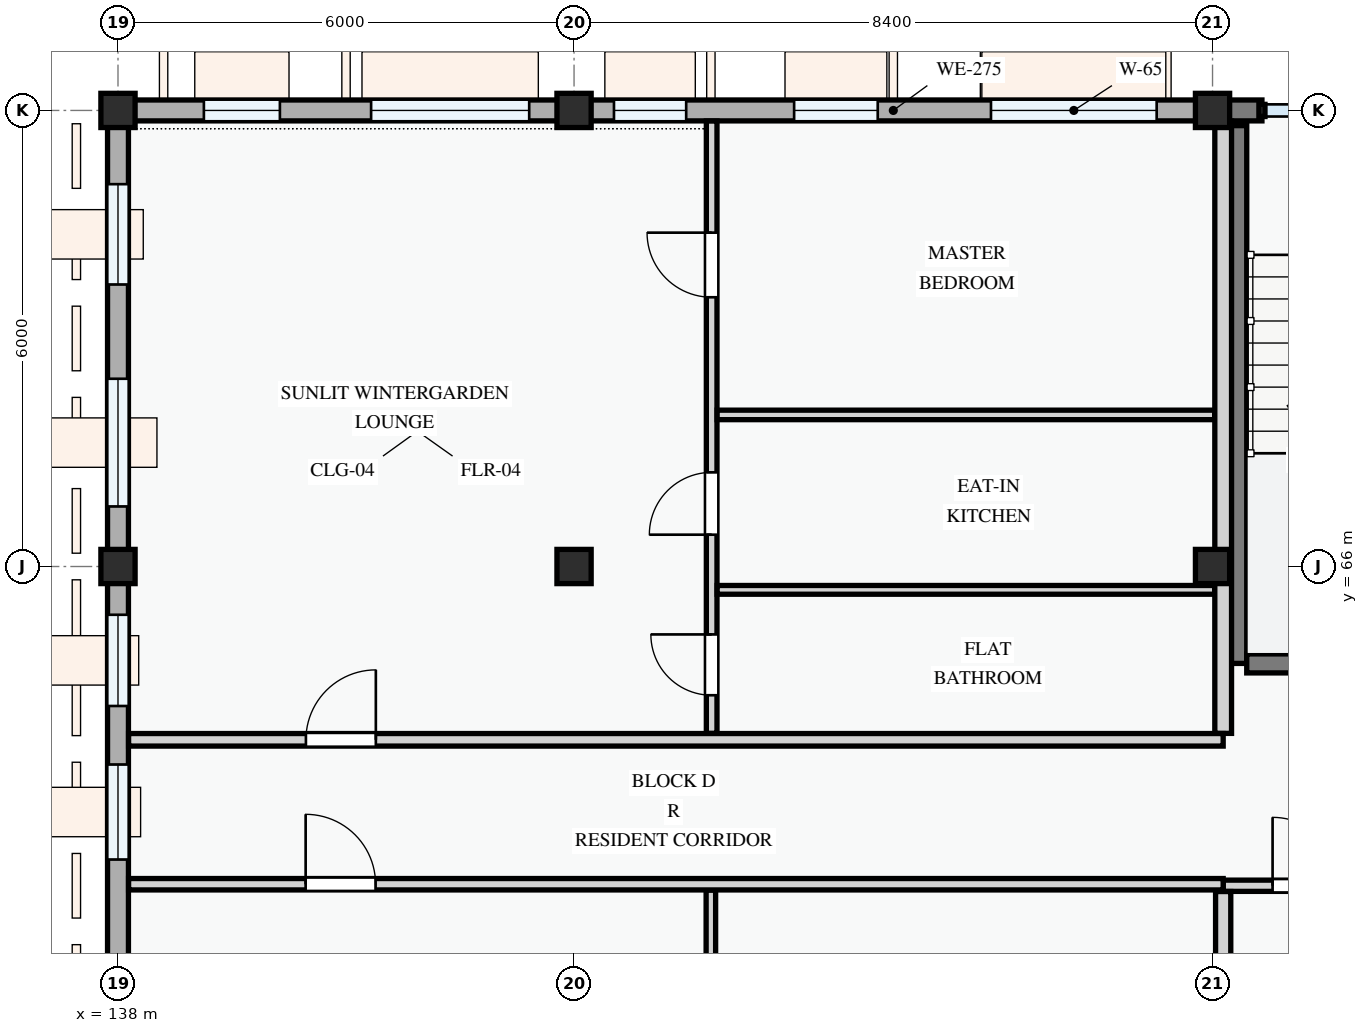
"""IFC4 building model, lengths in metres.
Left out: names, types, materials, properties, quantities, classifications, styles, units other than length and angle.
Written with IfcOpenShell. Run it as: python <this file> out.ifc"""

import sys

from ifc_helpers import new_model, si_unit, direction, frame, frame_2d, origin, origin_2d, place, context, subcontext, project, spatial, rectangle, extrude, element, fill, save


model = new_model("IFC4")
c1 = context("Model", 3, precision=1e-05, world=origin(), true_north=direction((0.0, 1.0)))
c2 = subcontext(c1, "Body", "Model", "MODEL_VIEW")
j1 = project(units=[si_unit("LENGTHUNIT", "METRE"), si_unit("PLANEANGLEUNIT", "RADIAN")], contexts=[c1])
p1 = place(None, origin())
s1 = spatial("IfcSite", under=j1, at=p1, CompositionType="ELEMENT")
p2 = place(p1, origin())
s2 = spatial("IfcBuilding", under=s1, at=p2, CompositionType="ELEMENT")
p3 = place(p2, frame((0.0, 0.0, 21.3)))
s3 = spatial("IfcBuildingStorey", under=s2, at=p3, CompositionType="ELEMENT", Elevation=21.3)
for number, where, z_axis, x_axis in (
    (1, (138.0, 66.0, 0.0), (0.0, 0.0, 1.0), (1.0, 0.0, 0.0)),
    (2, (138.0, 72.0, 0.0), (0.0, 0.0, 1.0), (1.0, 0.0, 0.0)),
    (3, (144.0, 66.0, 0.0), (0.0, 0.0, 1.0), (1.0, 0.0, 0.0)),
    (4, (144.0, 72.0, 0.0), (0.0, 0.0, 1.0), (1.0, 0.0, 0.0)),
    (5, (152.4, 66.0, 0.0), (0.0, 0.0, 1.0), (1.0, 0.0, 0.0)),
    (6, (152.4, 72.0, 0.0), (0.0, 0.0, 1.0), (1.0, 0.0, 0.0)),
):
    element("IfcColumn", number, at=place(p3, frame(where, z_axis=z_axis, x_axis=x_axis)), inside=s3, PredefinedType="COLUMN", context=c2, shape_type="SweptSolid", body=[
        extrude(rectangle(XDim=0.45, YDim=0.45, at=origin_2d()), origin(), (0.0, 0.0, 1.0), 3.3),
    ])
p4 = place(p3, frame((152.4, 72.0, 0.0), z_axis=(0.0, 0.0, 1.0), x_axis=(-1.0, 0.0, 0.0)))
e7 = element("IfcWall", 7, at=p4, inside=s3, PredefinedType="STANDARD", context=c2, shape_type="SweptSolid", body=[
    extrude(rectangle(XDim=8.4, YDim=0.275, at=frame_2d((4.2, 0.0))), origin(), (0.0, 0.0, 1.0), 2.375),
])
p5 = place(p4, frame((0.735, 0.0, 0.78)))
e8 = element("IfcOpeningElement", 8, at=p5, cuts=e7, PredefinedType="OPENING", context=c2, shape_type="SweptSolid", body=[
    extrude(rectangle(XDim=2.18, YDim=1.48, at=frame_2d((1.09, 0.74))), frame((0.0, 0.147, 0.0), z_axis=(0.0, -1.0, 0.0), x_axis=(1.0, 0.0, 0.0)), (0.0, 0.0, 1.0), 0.295),
])
p6 = place(p4, frame((4.405, 0.0, 0.78)))
e9 = element("IfcOpeningElement", 9, at=p6, cuts=e7, PredefinedType="OPENING", context=c2, shape_type="SweptSolid", body=[
    extrude(rectangle(XDim=1.1, YDim=1.3, at=frame_2d((0.55, 0.65))), frame((0.0, 0.147, 0.0), z_axis=(0.0, -1.0, 0.0), x_axis=(1.0, 0.0, 0.0)), (0.0, 0.0, 1.0), 0.295),
])
p7 = place(p4, frame((6.925, 0.0, 0.78)))
e10 = element("IfcOpeningElement", 10, at=p7, cuts=e7, PredefinedType="OPENING", context=c2, shape_type="SweptSolid", body=[
    extrude(rectangle(XDim=0.95, YDim=1.15, at=frame_2d((0.475, 0.575))), frame((0.0, 0.147, 0.0), z_axis=(0.0, -1.0, 0.0), x_axis=(1.0, 0.0, 0.0)), (0.0, 0.0, 1.0), 0.295),
])
p8 = place(p3, frame((144.0, 72.0, 0.0), z_axis=(0.0, 0.0, 1.0), x_axis=(-1.0, 0.0, 0.0)))
e11 = element("IfcWall", 11, at=p8, inside=s3, PredefinedType="STANDARD", context=c2, shape_type="SweptSolid", body=[
    extrude(rectangle(XDim=6.0, YDim=0.275, at=frame_2d((3.0, 0.0))), origin(), (0.0, 0.0, 1.0), 2.475),
])
p9 = place(p8, frame((0.59, 0.0, 0.78)))
e12 = element("IfcOpeningElement", 12, at=p9, cuts=e11, PredefinedType="OPENING", context=c2, shape_type="SweptSolid", body=[
    extrude(rectangle(XDim=2.08, YDim=1.52, at=frame_2d((1.04, 0.76))), frame((0.0, 0.147, 0.0), z_axis=(0.0, -1.0, 0.0), x_axis=(1.0, 0.0, 0.0)), (0.0, 0.0, 1.0), 0.295),
])
p10 = place(p8, frame((3.87, 0.0, 0.78)))
e13 = element("IfcOpeningElement", 13, at=p10, cuts=e11, PredefinedType="OPENING", context=c2, shape_type="SweptSolid", body=[
    extrude(rectangle(XDim=1.0, YDim=1.25, at=frame_2d((0.5, 0.625))), frame((0.0, 0.147, 0.0), z_axis=(0.0, -1.0, 0.0), x_axis=(1.0, 0.0, 0.0)), (0.0, 0.0, 1.0), 0.295),
])
p11 = place(p3, frame((138.0, 72.0, 0.0), z_axis=(0.0, 0.0, 1.0), x_axis=(0.0, -1.0, 0.0)))
e14 = element("IfcWall", 14, at=p11, inside=s3, PredefinedType="STANDARD", context=c2, shape_type="SweptSolid", body=[
    extrude(rectangle(XDim=6.0, YDim=0.275, at=frame_2d((3.0, 0.0))), origin(), (0.0, 0.0, 1.0), 2.575),
])
p12 = place(p11, frame((0.97, 0.0, 0.78)))
e15 = element("IfcOpeningElement", 15, at=p12, cuts=e14, PredefinedType="OPENING", context=c2, shape_type="SweptSolid", body=[
    extrude(rectangle(XDim=1.32, YDim=1.35, at=frame_2d((0.66, 0.675))), frame((0.0, 0.147, 0.0), z_axis=(0.0, -1.0, 0.0), x_axis=(1.0, 0.0, 0.0)), (0.0, 0.0, 1.0), 0.295),
])
p13 = place(p11, frame((3.53, 0.0, 0.78)))
e16 = element("IfcOpeningElement", 16, at=p13, cuts=e14, PredefinedType="OPENING", context=c2, shape_type="SweptSolid", body=[
    extrude(rectangle(XDim=1.68, YDim=1.46, at=frame_2d((0.84, 0.73))), frame((0.0, 0.147, 0.0), z_axis=(0.0, -1.0, 0.0), x_axis=(1.0, 0.0, 0.0)), (0.0, 0.0, 1.0), 0.295),
])
p14 = place(p3, frame((138.0, 66.0, 0.0), z_axis=(0.0, 0.0, 1.0), x_axis=(0.0, -1.0, 0.0)))
e17 = element("IfcWall", 17, at=p14, inside=s3, PredefinedType="STANDARD", context=c2, shape_type="SweptSolid", body=[
    extrude(rectangle(XDim=8.4, YDim=0.275, at=frame_2d((4.2, 0.0))), origin(), (0.0, 0.0, 1.0), 2.425),
])
p15 = place(p14, frame((0.635, 0.0, 0.78)))
e18 = element("IfcOpeningElement", 18, at=p15, cuts=e17, PredefinedType="OPENING", context=c2, shape_type="SweptSolid", body=[
    extrude(rectangle(XDim=1.2, YDim=1.5, at=frame_2d((0.6, 0.75))), frame((0.0, 0.147, 0.0), z_axis=(0.0, -1.0, 0.0), x_axis=(1.0, 0.0, 0.0)), (0.0, 0.0, 1.0), 0.295),
])
p16 = place(p14, frame((2.605, 0.0, 0.78)))
e19 = element("IfcOpeningElement", 19, at=p16, cuts=e17, PredefinedType="OPENING", context=c2, shape_type="SweptSolid", body=[
    extrude(rectangle(XDim=1.25, YDim=1.3, at=frame_2d((0.625, 0.65))), frame((0.0, 0.147, 0.0), z_axis=(0.0, -1.0, 0.0), x_axis=(1.0, 0.0, 0.0)), (0.0, 0.0, 1.0), 0.295),
])
p17 = place(p14, frame((5.435, 0.0, 0.78)))
e20 = element("IfcOpeningElement", 20, at=p17, cuts=e17, PredefinedType="OPENING", context=c2, shape_type="SweptSolid", body=[
    extrude(rectangle(XDim=1.52, YDim=1.42, at=frame_2d((0.76, 0.71))), frame((0.0, 0.147, 0.0), z_axis=(0.0, -1.0, 0.0), x_axis=(1.0, 0.0, 0.0)), (0.0, 0.0, 1.0), 0.295),
])
p18 = place(p3, frame((153.05, 72.0, 0.0), z_axis=(0.0, 0.0, 1.0), x_axis=(-1.0, 0.0, 0.0)))
e21 = element("IfcWall", 21, at=p18, inside=s3, PredefinedType="STANDARD", context=c2, shape_type="SweptSolid", body=[
    extrude(rectangle(XDim=0.65, YDim=0.275, at=frame_2d((0.325, 0.0))), origin(), (0.0, 0.0, 1.0), 3.04),
])
p19 = place(p3, frame((152.725, 71.8, 0.0), z_axis=(0.0, 0.0, 1.0), x_axis=(0.0, -1.0, 0.0)))
e22 = element("IfcWall", 22, at=p19, inside=s3, PredefinedType="SHEAR", context=c2, shape_type="SweptSolid", body=[
    extrude(rectangle(XDim=7.075, YDim=0.25, at=frame_2d((3.538, 0.0))), origin(), (0.0, 0.0, 1.0), 3.0),
])
p20 = place(p3, frame((152.85, 64.725, 0.0), z_axis=(0.0, 0.0, 1.0), x_axis=(1.0, 0.0, 0.0)))
e23 = element("IfcWall", 23, at=p20, inside=s3, PredefinedType="SHEAR", context=c2, shape_type="SweptSolid", body=[
    extrude(rectangle(XDim=13.5, YDim=0.25, at=frame_2d((6.75, 0.0))), origin(), (0.0, 0.0, 1.0), 3.0),
])
p21 = place(p20, frame((6.2, 0.0, 0.0)))
e24 = element("IfcOpeningElement", 24, at=p21, cuts=e23, PredefinedType="OPENING", context=c2, shape_type="SweptSolid", body=[
    extrude(rectangle(XDim=1.1, YDim=2.15, at=frame_2d((0.55, 1.075))), frame((0.0, 0.135, 0.0), z_axis=(0.0, -1.0, 0.0), x_axis=(1.0, 0.0, 0.0)), (0.0, 0.0, 1.0), 0.27),
])
p22 = place(p3, frame((152.54, 61.8, 0.0), z_axis=(0.0, 0.0, 1.0), x_axis=(1.0, 0.0, 0.0)))
e25 = element("IfcWall", 25, at=p22, inside=s3, PredefinedType="PARTITIONING", context=c2, shape_type="SweptSolid", body=[
    extrude(rectangle(XDim=7.435, YDim=0.148, at=frame_2d((3.718, 0.0))), origin(), (0.0, 0.0, 1.0), 3.0),
])
p23 = place(p22, frame((0.65, 0.0, 0.0)))
e26 = element("IfcOpeningElement", 26, at=p23, cuts=e25, PredefinedType="OPENING", context=c2, shape_type="SweptSolid", body=[
    extrude(rectangle(XDim=0.9, YDim=2.1, at=frame_2d((0.45, 1.05))), frame((0.0, 0.084, 0.0), z_axis=(0.0, -1.0, 0.0), x_axis=(1.0, 0.0, 0.0)), (0.0, 0.0, 1.0), 0.168),
])
p24 = place(p22, frame((4.2, 0.0, 0.0)))
e27 = element("IfcOpeningElement", 27, at=p24, cuts=e25, PredefinedType="OPENING", context=c2, shape_type="SweptSolid", body=[
    extrude(rectangle(XDim=0.95, YDim=2.1, at=frame_2d((0.475, 1.05))), frame((0.0, 0.084, 0.0), z_axis=(0.0, -1.0, 0.0), x_axis=(1.0, 0.0, 0.0)), (0.0, 0.0, 1.0), 0.168),
])
p25 = place(p3, frame((145.8, 43.34, 0.0), z_axis=(0.0, 0.0, 1.0), x_axis=(0.0, 1.0, 0.0)))
e28 = element("IfcWall", 28, at=p25, inside=s3, PredefinedType="PARTITIONING", context=c2, shape_type="SweptSolid", body=[
    extrude(rectangle(XDim=18.403, YDim=0.125, at=frame_2d((9.202, 0.0))), origin(), (0.0, 0.0, 1.0), 3.0),
])
p26 = place(p25, frame((3.95, 0.0, 0.0)))
e29 = element("IfcOpeningElement", 29, at=p26, cuts=e28, PredefinedType="OPENING", context=c2, shape_type="SweptSolid", body=[
    extrude(rectangle(XDim=0.82, YDim=2.08, at=frame_2d((0.41, 1.04))), frame((0.0, 0.073, 0.0), z_axis=(0.0, -1.0, 0.0), x_axis=(1.0, 0.0, 0.0)), (0.0, 0.0, 1.0), 0.145),
])
p27 = place(p25, frame((11.003, 0.0, 0.0)))
e30 = element("IfcOpeningElement", 30, at=p27, cuts=e28, PredefinedType="OPENING", context=c2, shape_type="SweptSolid", body=[
    extrude(rectangle(XDim=0.85, YDim=2.1, at=frame_2d((0.425, 1.05))), frame((0.0, 0.073, 0.0), z_axis=(0.0, -1.0, 0.0), x_axis=(1.0, 0.0, 0.0)), (0.0, 0.0, 1.0), 0.145),
])
p28 = place(p25, frame((15.853, 0.0, 0.0)))
e31 = element("IfcOpeningElement", 31, at=p28, cuts=e28, PredefinedType="OPENING", context=c2, shape_type="SweptSolid", body=[
    extrude(rectangle(XDim=0.8, YDim=2.1, at=frame_2d((0.4, 1.05))), frame((0.0, 0.073, 0.0), z_axis=(0.0, -1.0, 0.0), x_axis=(1.0, 0.0, 0.0)), (0.0, 0.0, 1.0), 0.145),
])
p29 = place(p3, frame((145.81, 63.804, 0.0), z_axis=(0.0, 0.0, 1.0), x_axis=(0.0, 1.0, 0.0)))
e32 = element("IfcWall", 32, at=p29, inside=s3, PredefinedType="PARTITIONING", context=c2, shape_type="SweptSolid", body=[
    extrude(rectangle(XDim=8.056, YDim=0.14, at=frame_2d((4.028, 0.0))), origin(), (0.0, 0.0, 1.0), 3.0),
])
p30 = place(p29, frame((0.502, 0.0, 0.0)))
e33 = element("IfcOpeningElement", 33, at=p30, cuts=e32, PredefinedType="OPENING", context=c2, shape_type="SweptSolid", body=[
    extrude(rectangle(XDim=0.8, YDim=2.1, at=frame_2d((0.4, 1.05))), frame((0.0, 0.08, 0.0), z_axis=(0.0, -1.0, 0.0), x_axis=(1.0, 0.0, 0.0)), (0.0, 0.0, 1.0), 0.16),
])
p31 = place(p29, frame((2.614, 0.0, 0.0)))
e34 = element("IfcOpeningElement", 34, at=p31, cuts=e32, PredefinedType="OPENING", context=c2, shape_type="SweptSolid", body=[
    extrude(rectangle(XDim=0.82, YDim=2.08, at=frame_2d((0.41, 1.04))), frame((0.0, 0.08, 0.0), z_axis=(0.0, -1.0, 0.0), x_axis=(1.0, 0.0, 0.0)), (0.0, 0.0, 1.0), 0.16),
])
p32 = place(p29, frame((5.738, 0.0, 0.0)))
e35 = element("IfcOpeningElement", 35, at=p32, cuts=e32, PredefinedType="OPENING", context=c2, shape_type="SweptSolid", body=[
    extrude(rectangle(XDim=0.85, YDim=2.1, at=frame_2d((0.425, 1.05))), frame((0.0, 0.08, 0.0), z_axis=(0.0, -1.0, 0.0), x_axis=(1.0, 0.0, 0.0)), (0.0, 0.0, 1.0), 0.16),
])
p33 = place(p3, frame((145.882, 67.994, 0.0), z_axis=(0.0, 0.0, 1.0), x_axis=(1.0, 0.0, 0.0)))
e36 = element("IfcWall", 36, at=p33, inside=s3, PredefinedType="PARTITIONING", context=c2, shape_type="SweptSolid", body=[
    extrude(rectangle(XDim=6.546, YDim=0.125, at=frame_2d((3.273, 0.0))), origin(), (0.0, 0.0, 1.0), 3.0),
])
p34 = place(p3, frame((145.882, 65.693, 0.0), z_axis=(0.0, 0.0, 1.0), x_axis=(1.0, 0.0, 0.0)))
e37 = element("IfcWall", 37, at=p34, inside=s3, PredefinedType="PARTITIONING", context=c2, shape_type="SweptSolid", body=[
    extrude(rectangle(XDim=6.546, YDim=0.115, at=frame_2d((3.273, 0.0))), origin(), (0.0, 0.0, 1.0), 2.375),
])
p35 = place(p3, frame((152.54, 43.26, 0.0), z_axis=(0.0, 0.0, 1.0), x_axis=(0.0, 1.0, 0.0)))
e38 = element("IfcWall", 38, at=p35, inside=s3, PredefinedType="PARTITIONING", context=c2, shape_type="SweptSolid", body=[
    extrude(rectangle(XDim=18.464, YDim=0.2, at=frame_2d((9.232, 0.0))), origin(), (0.0, 0.0, 1.0), 2.425),
])
p36 = place(p3, frame((152.54, 63.804, 0.0), z_axis=(0.0, 0.0, 1.0), x_axis=(0.0, 1.0, 0.0)))
e39 = element("IfcWall", 39, at=p36, inside=s3, PredefinedType="PARTITIONING", context=c2, shape_type="SweptSolid", body=[
    extrude(rectangle(XDim=8.056, YDim=0.22, at=frame_2d((4.028, 0.0))), origin(), (0.0, 0.0, 1.0), 2.425),
])
p37 = place(p3, frame((138.139, 61.82, 0.0), z_axis=(0.0, 0.0, 1.0), x_axis=(1.0, 0.0, 0.0)))
e40 = element("IfcWall", 40, at=p37, inside=s3, PredefinedType="PARTITIONING", context=c2, shape_type="SweptSolid", body=[
    extrude(rectangle(XDim=14.401, YDim=0.15, at=frame_2d((7.2, 0.0))), origin(), (0.0, 0.0, 1.0), 3.0),
])
p38 = place(p37, frame((2.329, 0.0, 0.0)))
e41 = element("IfcOpeningElement", 41, at=p38, cuts=e40, PredefinedType="OPENING", context=c2, shape_type="SweptSolid", body=[
    extrude(rectangle(XDim=0.92, YDim=2.1, at=frame_2d((0.46, 1.05))), frame((0.0, 0.085, 0.0), z_axis=(0.0, -1.0, 0.0), x_axis=(1.0, 0.0, 0.0)), (0.0, 0.0, 1.0), 0.17),
])
p39 = place(p3, frame((138.139, 63.72, 0.0), z_axis=(0.0, 0.0, 1.0), x_axis=(1.0, 0.0, 0.0)))
e42 = element("IfcWall", 42, at=p39, inside=s3, PredefinedType="PARTITIONING", context=c2, shape_type="SweptSolid", body=[
    extrude(rectangle(XDim=14.401, YDim=0.165, at=frame_2d((7.2, 0.0))), origin(), (0.0, 0.0, 1.0), 3.0),
])
p40 = place(p39, frame((2.333, 0.0, 0.0)))
e43 = element("IfcOpeningElement", 43, at=p40, cuts=e42, PredefinedType="OPENING", context=c2, shape_type="SweptSolid", body=[
    extrude(rectangle(XDim=0.92, YDim=2.1, at=frame_2d((0.46, 1.05))), frame((0.0, 0.093, 0.0), z_axis=(0.0, -1.0, 0.0), x_axis=(1.0, 0.0, 0.0)), (0.0, 0.0, 1.0), 0.185),
])
p41 = place(p5, origin())
e44 = element("IfcWindow", 44, at=p41, inside=s3, PartitioningType="DOUBLE_PANEL_VERTICAL", PredefinedType="WINDOW", context=c2, shape_type="SweptSolid", body=[
    extrude(rectangle(XDim=2.18, YDim=1.48, at=frame_2d((1.09, 0.74))), frame((0.0, 0.03, 0.0), z_axis=(0.0, -1.0, 0.0), x_axis=(1.0, 0.0, 0.0)), (0.0, 0.0, 1.0), 0.06),
])
fill(e8, e44)
p42 = place(p6, origin())
e45 = element("IfcWindow", 45, at=p42, inside=s3, PartitioningType="SINGLE_PANEL", PredefinedType="WINDOW", context=c2, shape_type="SweptSolid", body=[
    extrude(rectangle(XDim=1.1, YDim=1.3, at=frame_2d((0.55, 0.65))), frame((0.0, 0.03, 0.0), z_axis=(0.0, -1.0, 0.0), x_axis=(1.0, 0.0, 0.0)), (0.0, 0.0, 1.0), 0.06),
])
fill(e9, e45)
p43 = place(p7, origin())
e46 = element("IfcWindow", 46, at=p43, inside=s3, PartitioningType="SINGLE_PANEL", PredefinedType="WINDOW", context=c2, shape_type="SweptSolid", body=[
    extrude(rectangle(XDim=0.95, YDim=1.15, at=frame_2d((0.475, 0.575))), frame((0.0, 0.03, 0.0), z_axis=(0.0, -1.0, 0.0), x_axis=(1.0, 0.0, 0.0)), (0.0, 0.0, 1.0), 0.06),
])
fill(e10, e46)
p44 = place(p9, origin())
e47 = element("IfcWindow", 47, at=p44, inside=s3, PartitioningType="DOUBLE_PANEL_VERTICAL", PredefinedType="WINDOW", context=c2, shape_type="SweptSolid", body=[
    extrude(rectangle(XDim=2.08, YDim=1.52, at=frame_2d((1.04, 0.76))), frame((0.0, 0.03, 0.0), z_axis=(0.0, -1.0, 0.0), x_axis=(1.0, 0.0, 0.0)), (0.0, 0.0, 1.0), 0.06),
])
fill(e12, e47)
p45 = place(p10, origin())
e48 = element("IfcWindow", 48, at=p45, inside=s3, PartitioningType="SINGLE_PANEL", PredefinedType="WINDOW", context=c2, shape_type="SweptSolid", body=[
    extrude(rectangle(XDim=1.0, YDim=1.25, at=frame_2d((0.5, 0.625))), frame((0.0, 0.03, 0.0), z_axis=(0.0, -1.0, 0.0), x_axis=(1.0, 0.0, 0.0)), (0.0, 0.0, 1.0), 0.06),
])
fill(e13, e48)
p46 = place(p12, origin())
e49 = element("IfcWindow", 49, at=p46, inside=s3, PartitioningType="SINGLE_PANEL", PredefinedType="WINDOW", context=c2, shape_type="SweptSolid", body=[
    extrude(rectangle(XDim=1.32, YDim=1.35, at=frame_2d((0.66, 0.675))), frame((0.0, 0.03, 0.0), z_axis=(0.0, -1.0, 0.0), x_axis=(1.0, 0.0, 0.0)), (0.0, 0.0, 1.0), 0.06),
])
fill(e15, e49)
p47 = place(p13, origin())
e50 = element("IfcWindow", 50, at=p47, inside=s3, PartitioningType="DOUBLE_PANEL_VERTICAL", PredefinedType="WINDOW", context=c2, shape_type="SweptSolid", body=[
    extrude(rectangle(XDim=1.68, YDim=1.46, at=frame_2d((0.84, 0.73))), frame((0.0, 0.03, 0.0), z_axis=(0.0, -1.0, 0.0), x_axis=(1.0, 0.0, 0.0)), (0.0, 0.0, 1.0), 0.06),
])
fill(e16, e50)
p48 = place(p15, origin())
e51 = element("IfcWindow", 51, at=p48, inside=s3, PartitioningType="SINGLE_PANEL", PredefinedType="WINDOW", context=c2, shape_type="SweptSolid", body=[
    extrude(rectangle(XDim=1.2, YDim=1.5, at=frame_2d((0.6, 0.75))), frame((0.0, 0.03, 0.0), z_axis=(0.0, -1.0, 0.0), x_axis=(1.0, 0.0, 0.0)), (0.0, 0.0, 1.0), 0.06),
])
fill(e18, e51)
p49 = place(p16, origin())
e52 = element("IfcWindow", 52, at=p49, inside=s3, PartitioningType="SINGLE_PANEL", PredefinedType="WINDOW", context=c2, shape_type="SweptSolid", body=[
    extrude(rectangle(XDim=1.25, YDim=1.3, at=frame_2d((0.625, 0.65))), frame((0.0, 0.03, 0.0), z_axis=(0.0, -1.0, 0.0), x_axis=(1.0, 0.0, 0.0)), (0.0, 0.0, 1.0), 0.06),
])
fill(e19, e52)
p50 = place(p23, origin())
e53 = element("IfcDoor", 53, at=p50, inside=s3, OperationType="SINGLE_SWING_LEFT", PredefinedType="DOOR", context=c2, shape_type="SweptSolid", body=[
    extrude(rectangle(XDim=0.9, YDim=2.1, at=frame_2d((0.45, 1.05))), frame((0.0, 0.025, 0.0), z_axis=(0.0, -1.0, 0.0), x_axis=(1.0, 0.0, 0.0)), (0.0, 0.0, 1.0), 0.05),
])
fill(e26, e53)
p51 = place(p30, origin())
e54 = element("IfcDoor", 54, at=p51, inside=s3, OperationType="SINGLE_SWING_RIGHT", PredefinedType="DOOR", context=c2, shape_type="SweptSolid", body=[
    extrude(rectangle(XDim=0.8, YDim=2.1, at=frame_2d((0.4, 1.05))), frame((0.0, 0.025, 0.0), z_axis=(0.0, -1.0, 0.0), x_axis=(1.0, 0.0, 0.0)), (0.0, 0.0, 1.0), 0.05),
])
fill(e33, e54)
p52 = place(p31, origin())
e55 = element("IfcDoor", 55, at=p52, inside=s3, OperationType="SINGLE_SWING_LEFT", PredefinedType="DOOR", context=c2, shape_type="SweptSolid", body=[
    extrude(rectangle(XDim=0.82, YDim=2.08, at=frame_2d((0.41, 1.04))), frame((0.0, 0.025, 0.0), z_axis=(0.0, -1.0, 0.0), x_axis=(1.0, 0.0, 0.0)), (0.0, 0.0, 1.0), 0.05),
])
fill(e34, e55)
p53 = place(p32, origin())
e56 = element("IfcDoor", 56, at=p53, inside=s3, OperationType="SINGLE_SWING_RIGHT", PredefinedType="DOOR", context=c2, shape_type="SweptSolid", body=[
    extrude(rectangle(XDim=0.85, YDim=2.1, at=frame_2d((0.425, 1.05))), frame((0.0, 0.025, 0.0), z_axis=(0.0, -1.0, 0.0), x_axis=(1.0, 0.0, 0.0)), (0.0, 0.0, 1.0), 0.05),
])
fill(e35, e56)
p54 = place(p38, origin())
e57 = element("IfcDoor", 57, at=p54, inside=s3, OperationType="SINGLE_SWING_LEFT", PredefinedType="DOOR", context=c2, shape_type="SweptSolid", body=[
    extrude(rectangle(XDim=0.92, YDim=2.1, at=frame_2d((0.46, 1.05))), frame((0.0, 0.025, 0.0), z_axis=(0.0, -1.0, 0.0), x_axis=(1.0, 0.0, 0.0)), (0.0, 0.0, 1.0), 0.05),
])
fill(e41, e57)
p55 = place(p40, origin())
e58 = element("IfcDoor", 58, at=p55, inside=s3, OperationType="SINGLE_SWING_RIGHT", PredefinedType="DOOR", context=c2, shape_type="SweptSolid", body=[
    extrude(rectangle(XDim=0.92, YDim=2.1, at=frame_2d((0.46, 1.05))), frame((0.0, 0.025, 0.0), z_axis=(0.0, -1.0, 0.0), x_axis=(1.0, 0.0, 0.0)), (0.0, 0.0, 1.0), 0.05),
])
fill(e43, e58)
save(model, sys.argv[1])
